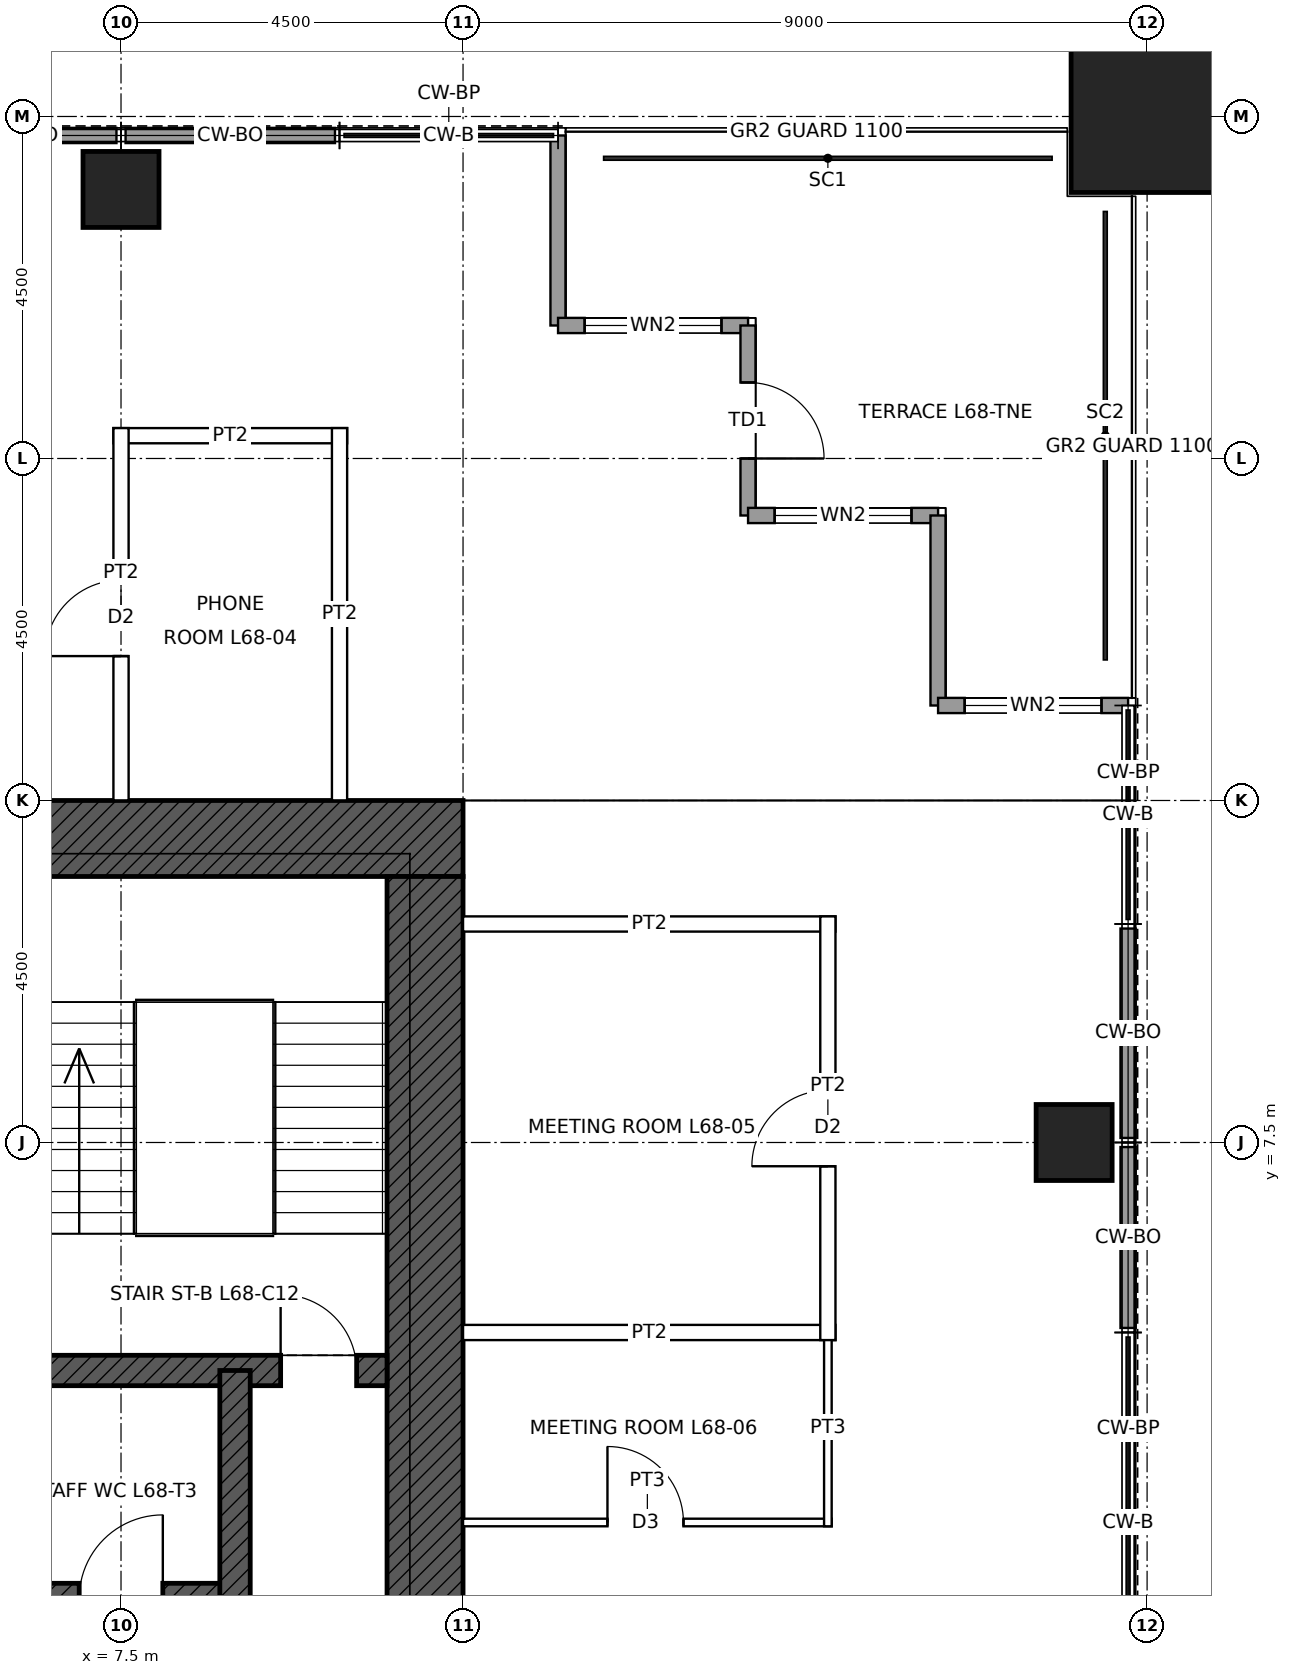
"""IFC4 building model, lengths in metres.
Left out: names, types, materials, properties, quantities, classifications, styles, units other than length and angle.
Written with IfcOpenShell. Run it as: python <this file> out.ifc"""

import sys

from ifc_helpers import new_model, si_unit, direction, frame, frame_2d, origin, origin_2d, place, context, subcontext, project, spatial, rectangle, hollow_rectangle, extrude, element, fill, save


model = new_model("IFC4")
c1 = context("Model", 3, precision=1e-05, world=origin(), true_north=direction((0.0, 1.0)))
c2 = subcontext(c1, "Body", "Model", "MODEL_VIEW")
j1 = project(units=[si_unit("LENGTHUNIT", "METRE"), si_unit("PLANEANGLEUNIT", "RADIAN")], contexts=[c1])
p1 = place(None, origin())
s1 = spatial("IfcSite", under=j1, at=p1, CompositionType="ELEMENT")
p2 = place(p1, origin())
s2 = spatial("IfcBuilding", under=s1, at=p2, CompositionType="ELEMENT")
p3 = place(p2, frame((0.0, 0.0, 307.9)))
s3 = spatial("IfcBuildingStorey", under=s2, at=p3, CompositionType="ELEMENT", Elevation=307.9)
p4 = place(p3, frame((21.0, 21.0, 0.0), z_axis=(0.0, 0.0, 1.0), x_axis=(1.0, 0.0, 0.0)))
e1 = element("IfcColumn", 1, at=p4, inside=s3, PredefinedType="COLUMN", context=c2, shape_type="SweptSolid", body=[
    extrude(hollow_rectangle(XDim=2.0, YDim=2.0, WallThickness=0.095, at=origin_2d()), origin(), (0.0, 0.0, 1.0), 4.0),
])
for number, where, z_axis, x_axis in (
    (2, (7.5, 20.04, 0.0), (0.0, 0.0, 1.0), (1.0, 0.0, 0.0)),
    (3, (20.04, 7.5, 0.0), (0.0, 0.0, 1.0), (1.0, 0.0, 0.0)),
):
    element("IfcColumn", number, at=place(p3, frame(where, z_axis=z_axis, x_axis=x_axis)), inside=s3, PredefinedType="COLUMN", context=c2, shape_type="SweptSolid", body=[
        extrude(hollow_rectangle(XDim=1.0, YDim=1.0, WallThickness=0.075, at=origin_2d()), origin(), (0.0, 0.0, 1.0), 4.0),
    ])
p5 = place(p3, frame((-12.0, 11.5, 0.0), z_axis=(0.0, 0.0, 1.0), x_axis=(1.0, 0.0, 0.0)))
e4 = element("IfcWall", 4, at=p5, inside=s3, PredefinedType="SHEAR", context=c2, shape_type="SweptSolid", body=[
    extrude(rectangle(XDim=24.0, YDim=1.0, at=frame_2d((12.0, 0.0))), origin(), (0.0, 0.0, 1.0), 4.0),
])
p6 = place(p5, frame((6.25, 0.0, 0.0)))
e5 = element("IfcOpeningElement", 5, at=p6, cuts=e4, PredefinedType="OPENING", context=c2, shape_type="SweptSolid", body=[
    extrude(rectangle(XDim=1.0, YDim=2.4, at=frame_2d((0.5, 1.2))), frame((0.0, 0.51, 0.0), z_axis=(0.0, -1.0, 0.0), x_axis=(1.0, 0.0, 0.0)), (0.0, 0.0, 1.0), 1.02),
])
p7 = place(p5, frame((16.75, 0.0, 0.0)))
e6 = element("IfcOpeningElement", 6, at=p7, cuts=e4, PredefinedType="OPENING", context=c2, shape_type="SweptSolid", body=[
    extrude(rectangle(XDim=1.0, YDim=2.4, at=frame_2d((0.5, 1.2))), frame((0.0, 0.51, 0.0), z_axis=(0.0, -1.0, 0.0), x_axis=(1.0, 0.0, 0.0)), (0.0, 0.0, 1.0), 1.02),
])
p8 = place(p3, frame((11.5, 11.0, 0.0), z_axis=(0.0, 0.0, 1.0), x_axis=(0.0, -1.0, 0.0)))
e7 = element("IfcWall", 7, at=p8, inside=s3, PredefinedType="SHEAR", context=c2, shape_type="SweptSolid", body=[
    extrude(rectangle(XDim=22.0, YDim=1.0, at=frame_2d((11.0, 0.0))), origin(), (0.0, 0.0, 1.0), 4.0),
])
p9 = place(p8, frame((10.5, 0.0, 0.0)))
e8 = element("IfcOpeningElement", 8, at=p9, cuts=e7, PredefinedType="OPENING", context=c2, shape_type="SweptSolid", body=[
    extrude(rectangle(XDim=1.0, YDim=2.4, at=frame_2d((0.5, 1.2))), frame((0.0, 0.51, 0.0), z_axis=(0.0, -1.0, 0.0), x_axis=(1.0, 0.0, 0.0)), (0.0, 0.0, 1.0), 1.02),
])
p10 = place(p3, frame((-11.0, 4.5, 0.0), z_axis=(0.0, 0.0, 1.0), x_axis=(1.0, 0.0, 0.0)))
e9 = element("IfcWall", 9, at=p10, inside=s3, PredefinedType="SHEAR", context=c2, shape_type="SweptSolid", body=[
    extrude(rectangle(XDim=22.0, YDim=0.4, at=frame_2d((11.0, 0.0))), origin(), (0.0, 0.0, 1.0), 4.0),
])
p11 = place(p10, frame((0.4, 0.0, 0.0)))
e10 = element("IfcOpeningElement", 10, at=p11, cuts=e9, PredefinedType="OPENING", context=c2, shape_type="SweptSolid", body=[
    extrude(rectangle(XDim=1.0, YDim=2.1, at=frame_2d((0.5, 1.05))), frame((0.0, 0.21, 0.0), z_axis=(0.0, -1.0, 0.0), x_axis=(1.0, 0.0, 0.0)), (0.0, 0.0, 1.0), 0.42),
])
p12 = place(p10, frame((20.6, 0.0, 0.0)))
e11 = element("IfcOpeningElement", 11, at=p12, cuts=e9, PredefinedType="OPENING", context=c2, shape_type="SweptSolid", body=[
    extrude(rectangle(XDim=1.0, YDim=2.1, at=frame_2d((0.5, 1.05))), frame((0.0, 0.21, 0.0), z_axis=(0.0, -1.0, 0.0), x_axis=(1.0, 0.0, 0.0)), (0.0, 0.0, 1.0), 0.42),
])
p13 = place(p3, frame((-9.0, 1.5, 0.0), z_axis=(0.0, 0.0, 1.0), x_axis=(1.0, 0.0, 0.0)))
e12 = element("IfcWall", 12, at=p13, inside=s3, PredefinedType="SHEAR", context=c2, shape_type="SweptSolid", body=[
    extrude(rectangle(XDim=18.0, YDim=0.4, at=frame_2d((9.0, 0.0))), origin(), (0.0, 0.0, 1.0), 4.0),
])
p14 = place(p13, frame((0.95, 0.0, 0.0)))
e13 = element("IfcOpeningElement", 13, at=p14, cuts=e12, PredefinedType="OPENING", context=c2, shape_type="SweptSolid", body=[
    extrude(rectangle(XDim=1.1, YDim=2.1, at=frame_2d((0.55, 1.05))), frame((0.0, 0.21, 0.0), z_axis=(0.0, -1.0, 0.0), x_axis=(1.0, 0.0, 0.0)), (0.0, 0.0, 1.0), 0.42),
])
p15 = place(p13, frame((3.95, 0.0, 0.0)))
e14 = element("IfcOpeningElement", 14, at=p15, cuts=e12, PredefinedType="OPENING", context=c2, shape_type="SweptSolid", body=[
    extrude(rectangle(XDim=1.1, YDim=2.1, at=frame_2d((0.55, 1.05))), frame((0.0, 0.21, 0.0), z_axis=(0.0, -1.0, 0.0), x_axis=(1.0, 0.0, 0.0)), (0.0, 0.0, 1.0), 0.42),
])
p16 = place(p13, frame((6.95, 0.0, 0.0)))
e15 = element("IfcOpeningElement", 15, at=p16, cuts=e12, PredefinedType="OPENING", context=c2, shape_type="SweptSolid", body=[
    extrude(rectangle(XDim=1.1, YDim=2.1, at=frame_2d((0.55, 1.05))), frame((0.0, 0.21, 0.0), z_axis=(0.0, -1.0, 0.0), x_axis=(1.0, 0.0, 0.0)), (0.0, 0.0, 1.0), 0.42),
])
p17 = place(p13, frame((9.95, 0.0, 0.0)))
e16 = element("IfcOpeningElement", 16, at=p17, cuts=e12, PredefinedType="OPENING", context=c2, shape_type="SweptSolid", body=[
    extrude(rectangle(XDim=1.1, YDim=2.1, at=frame_2d((0.55, 1.05))), frame((0.0, 0.21, 0.0), z_axis=(0.0, -1.0, 0.0), x_axis=(1.0, 0.0, 0.0)), (0.0, 0.0, 1.0), 0.42),
])
p18 = place(p13, frame((12.95, 0.0, 0.0)))
e17 = element("IfcOpeningElement", 17, at=p18, cuts=e12, PredefinedType="OPENING", context=c2, shape_type="SweptSolid", body=[
    extrude(rectangle(XDim=1.1, YDim=2.1, at=frame_2d((0.55, 1.05))), frame((0.0, 0.21, 0.0), z_axis=(0.0, -1.0, 0.0), x_axis=(1.0, 0.0, 0.0)), (0.0, 0.0, 1.0), 0.42),
])
p19 = place(p13, frame((15.95, 0.0, 0.0)))
e18 = element("IfcOpeningElement", 18, at=p19, cuts=e12, PredefinedType="OPENING", context=c2, shape_type="SweptSolid", body=[
    extrude(rectangle(XDim=1.1, YDim=2.1, at=frame_2d((0.55, 1.05))), frame((0.0, 0.21, 0.0), z_axis=(0.0, -1.0, 0.0), x_axis=(1.0, 0.0, 0.0)), (0.0, 0.0, 1.0), 0.42),
])
p20 = place(p3, frame((9.0, 1.5, 0.0), z_axis=(0.0, 0.0, 1.0), x_axis=(0.0, 1.0, 0.0)))
e19 = element("IfcWall", 19, at=p20, inside=s3, PredefinedType="SHEAR", context=c2, shape_type="SweptSolid", body=[
    extrude(rectangle(XDim=3.0, YDim=0.4, at=frame_2d((1.5, 0.0))), origin(), (0.0, 0.0, 1.0), 4.0),
])
p21 = place(p3, frame((13.25, 20.75, 0.0), z_axis=(0.0, 0.0, 1.0), x_axis=(0.0, -1.0, 0.0)))
e20 = element("IfcWall", 20, at=p21, inside=s3, PredefinedType="SOLIDWALL", context=c2, shape_type="SweptSolid", body=[
    extrude(rectangle(XDim=2.5, YDim=0.2, at=frame_2d((1.25, 0.0))), origin(), (0.0, 0.0, 1.0), 3.85),
])
p22 = place(p3, frame((13.25, 18.25, 0.0), z_axis=(0.0, 0.0, 1.0), x_axis=(1.0, 0.0, 0.0)))
e21 = element("IfcWall", 21, at=p22, inside=s3, PredefinedType="SOLIDWALL", context=c2, shape_type="SweptSolid", body=[
    extrude(rectangle(XDim=2.5, YDim=0.2, at=frame_2d((1.25, 0.0))), origin(), (0.0, 0.0, 1.0), 3.85),
])
p23 = place(p22, frame((0.35, 0.0, 0.3)))
e22 = element("IfcOpeningElement", 22, at=p23, cuts=e21, PredefinedType="OPENING", context=c2, shape_type="SweptSolid", body=[
    extrude(rectangle(XDim=1.8, YDim=2.4, at=frame_2d((0.9, 1.2))), frame((0.0, 0.11, 0.0), z_axis=(0.0, -1.0, 0.0), x_axis=(1.0, 0.0, 0.0)), (0.0, 0.0, 1.0), 0.22),
])
p24 = place(p3, frame((15.75, 18.25, 0.0), z_axis=(0.0, 0.0, 1.0), x_axis=(0.0, -1.0, 0.0)))
e23 = element("IfcWall", 23, at=p24, inside=s3, PredefinedType="SOLIDWALL", context=c2, shape_type="SweptSolid", body=[
    extrude(rectangle(XDim=2.5, YDim=0.2, at=frame_2d((1.25, 0.0))), origin(), (0.0, 0.0, 1.0), 3.317),
])
p25 = place(p24, frame((0.75, 0.0, 0.0)))
e24 = element("IfcOpeningElement", 24, at=p25, cuts=e23, PredefinedType="OPENING", context=c2, shape_type="SweptSolid", body=[
    extrude(rectangle(XDim=1.0, YDim=2.4, at=frame_2d((0.5, 1.2))), frame((0.0, 0.11, 0.0), z_axis=(0.0, -1.0, 0.0), x_axis=(1.0, 0.0, 0.0)), (0.0, 0.0, 1.0), 0.22),
])
p26 = place(p3, frame((15.75, 15.75, 0.0), z_axis=(0.0, 0.0, 1.0), x_axis=(1.0, 0.0, 0.0)))
e25 = element("IfcWall", 25, at=p26, inside=s3, PredefinedType="SOLIDWALL", context=c2, shape_type="SweptSolid", body=[
    extrude(rectangle(XDim=2.5, YDim=0.2, at=frame_2d((1.25, 0.0))), origin(), (0.0, 0.0, 1.0), 3.85),
])
p27 = place(p26, frame((0.35, 0.0, 0.3)))
e26 = element("IfcOpeningElement", 26, at=p27, cuts=e25, PredefinedType="OPENING", context=c2, shape_type="SweptSolid", body=[
    extrude(rectangle(XDim=1.8, YDim=2.4, at=frame_2d((0.9, 1.2))), frame((0.0, 0.11, 0.0), z_axis=(0.0, -1.0, 0.0), x_axis=(1.0, 0.0, 0.0)), (0.0, 0.0, 1.0), 0.22),
])
p28 = place(p3, frame((18.25, 15.75, 0.0), z_axis=(0.0, 0.0, 1.0), x_axis=(0.0, -1.0, 0.0)))
e27 = element("IfcWall", 27, at=p28, inside=s3, PredefinedType="SOLIDWALL", context=c2, shape_type="SweptSolid", body=[
    extrude(rectangle(XDim=2.5, YDim=0.2, at=frame_2d((1.25, 0.0))), origin(), (0.0, 0.0, 1.0), 3.85),
])
p29 = place(p3, frame((18.25, 13.25, 0.0), z_axis=(0.0, 0.0, 1.0), x_axis=(1.0, 0.0, 0.0)))
e28 = element("IfcWall", 28, at=p29, inside=s3, PredefinedType="SOLIDWALL", context=c2, shape_type="SweptSolid", body=[
    extrude(rectangle(XDim=2.5, YDim=0.2, at=frame_2d((1.25, 0.0))), origin(), (0.0, 0.0, 1.0), 3.85),
])
p30 = place(p29, frame((0.35, 0.0, 0.3)))
e29 = element("IfcOpeningElement", 29, at=p30, cuts=e28, PredefinedType="OPENING", context=c2, shape_type="SweptSolid", body=[
    extrude(rectangle(XDim=1.8, YDim=2.4, at=frame_2d((0.9, 1.2))), frame((0.0, 0.11, 0.0), z_axis=(0.0, -1.0, 0.0), x_axis=(1.0, 0.0, 0.0)), (0.0, 0.0, 1.0), 0.22),
])
p31 = place(p3, frame((5.06, 20.75, 0.0), z_axis=(0.0, 0.0, 1.0), x_axis=(1.0, 0.0, 0.0)))
e30 = element("IfcWall", 30, at=p31, inside=s3, PredefinedType="SOLIDWALL", context=c2, shape_type="SweptSolid", body=[
    extrude(rectangle(XDim=2.38, YDim=0.2, at=frame_2d((1.19, 0.0))), origin(), (0.0, 0.0, 1.0), 3.85),
])
for number, where, z_axis, x_axis in (
    (31, (7.56, 20.75, 0.0), (0.0, 0.0, 1.0), (1.0, 0.0, 0.0)),
    (32, (20.75, 10.315, 0.0), (0.0, 0.0, 1.0), (0.0, -1.0, 0.0)),
):
    element("IfcWall", number, at=place(p3, frame(where, z_axis=z_axis, x_axis=x_axis)), inside=s3, PredefinedType="SOLIDWALL", context=c2, shape_type="SweptSolid", body=[
        extrude(rectangle(XDim=2.755, YDim=0.2, at=frame_2d((1.377, 0.0))), origin(), (0.0, 0.0, 1.0), 3.85),
    ])
p32 = place(p3, frame((20.75, 7.44, 0.0), z_axis=(0.0, 0.0, 1.0), x_axis=(0.0, -1.0, 0.0)))
e33 = element("IfcWall", 33, at=p32, inside=s3, PredefinedType="SOLIDWALL", context=c2, shape_type="SweptSolid", body=[
    extrude(rectangle(XDim=2.38, YDim=0.2, at=frame_2d((1.19, 0.0))), origin(), (0.0, 0.0, 1.0), 3.85),
])
p33 = place(p3, frame((12.0, 2.5, 0.0), z_axis=(0.0, 0.0, 1.0), x_axis=(1.0, 0.0, 0.0)))
e34 = element("IfcWall", 34, at=p33, inside=s3, PredefinedType="PARTITIONING", context=c2, shape_type="SweptSolid", body=[
    extrude(rectangle(XDim=4.85, YDim=0.1, at=frame_2d((2.425, 0.0))), origin(), (0.0, 0.0, 1.0), 3.85),
])
p34 = place(p33, frame((1.9, 0.0, 0.0)))
e35 = element("IfcOpeningElement", 35, at=p34, cuts=e34, PredefinedType="OPENING", context=c2, shape_type="SweptSolid", body=[
    extrude(rectangle(XDim=1.0, YDim=2.1, at=frame_2d((0.5, 1.05))), frame((0.0, 0.06, 0.0), z_axis=(0.0, -1.0, 0.0), x_axis=(1.0, 0.0, 0.0)), (0.0, 0.0, 1.0), 0.12),
])
for number, where, z_axis, x_axis in (
    (36, (12.0, 5.0, 0.0), (0.0, 0.0, 1.0), (1.0, 0.0, 0.0)),
    (37, (12.0, 10.375, 0.0), (0.0, 0.0, 1.0), (1.0, 0.0, 0.0)),
):
    element("IfcWall", number, at=place(p3, frame(where, z_axis=z_axis, x_axis=x_axis)), inside=s3, PredefinedType="PARTITIONING", context=c2, shape_type="SweptSolid", body=[
        extrude(rectangle(XDim=4.9, YDim=0.2, at=frame_2d((2.45, 0.0))), origin(), (0.0, 0.0, 1.0), 3.85),
    ])
p35 = place(p3, frame((7.4, 16.8, 0.0), z_axis=(0.0, 0.0, 1.0), x_axis=(1.0, 0.0, 0.0)))
e38 = element("IfcWall", 38, at=p35, inside=s3, PredefinedType="PARTITIONING", context=c2, shape_type="SweptSolid", body=[
    extrude(rectangle(XDim=3.075, YDim=0.2, at=frame_2d((1.538, 0.0))), origin(), (0.0, 0.0, 1.0), 3.85),
])
p36 = place(p3, frame((7.5, 12.0, 0.0), z_axis=(0.0, 0.0, 1.0), x_axis=(0.0, 1.0, 0.0)))
e39 = element("IfcWall", 39, at=p36, inside=s3, PredefinedType="PARTITIONING", context=c2, shape_type="SweptSolid", body=[
    extrude(rectangle(XDim=4.9, YDim=0.2, at=frame_2d((2.45, 0.0))), origin(), (0.0, 0.0, 1.0), 3.243),
])
p37 = place(p36, frame((1.9, 0.0, 0.0)))
e40 = element("IfcOpeningElement", 40, at=p37, cuts=e39, PredefinedType="OPENING", context=c2, shape_type="SweptSolid", body=[
    extrude(rectangle(XDim=1.0, YDim=2.1, at=frame_2d((0.5, 1.05))), frame((0.0, 0.11, 0.0), z_axis=(0.0, -1.0, 0.0), x_axis=(1.0, 0.0, 0.0)), (0.0, 0.0, 1.0), 0.22),
])
p38 = place(p3, frame((10.375, 12.0, 0.0), z_axis=(0.0, 0.0, 1.0), x_axis=(0.0, 1.0, 0.0)))
e41 = element("IfcWall", 41, at=p38, inside=s3, PredefinedType="PARTITIONING", context=c2, shape_type="SweptSolid", body=[
    extrude(rectangle(XDim=4.9, YDim=0.2, at=frame_2d((2.45, 0.0))), origin(), (0.0, 0.0, 1.0), 3.85),
])
p39 = place(p3, frame((16.8, 2.45, 0.0), z_axis=(0.0, 0.0, 1.0), x_axis=(0.0, 1.0, 0.0)))
e42 = element("IfcWall", 42, at=p39, inside=s3, PredefinedType="PARTITIONING", context=c2, shape_type="SweptSolid", body=[
    extrude(rectangle(XDim=2.6, YDim=0.1, at=frame_2d((1.3, 0.0))), origin(), (0.0, 0.0, 1.0), 3.85),
])
p40 = place(p3, frame((16.8, 4.9, 0.0), z_axis=(0.0, 0.0, 1.0), x_axis=(0.0, 1.0, 0.0)))
e43 = element("IfcWall", 43, at=p40, inside=s3, PredefinedType="PARTITIONING", context=c2, shape_type="SweptSolid", body=[
    extrude(rectangle(XDim=5.575, YDim=0.2, at=frame_2d((2.788, 0.0))), origin(), (0.0, 0.0, 1.0), 3.85),
])
p41 = place(p40, frame((2.288, 0.0, 0.0)))
e44 = element("IfcOpeningElement", 44, at=p41, cuts=e43, PredefinedType="OPENING", context=c2, shape_type="SweptSolid", body=[
    extrude(rectangle(XDim=1.0, YDim=2.1, at=frame_2d((0.5, 1.05))), frame((0.0, 0.11, 0.0), z_axis=(0.0, -1.0, 0.0), x_axis=(1.0, 0.0, 0.0)), (0.0, 0.0, 1.0), 0.22),
])
p42 = place(p23, origin())
e45 = element("IfcWindow", 45, at=p42, inside=s3, PartitioningType="SINGLE_PANEL", PredefinedType="WINDOW", context=c2, shape_type="SweptSolid", body=[
    extrude(rectangle(XDim=1.8, YDim=2.4, at=frame_2d((0.9, 1.2))), frame((0.0, 0.03, 0.0), z_axis=(0.0, -1.0, 0.0), x_axis=(1.0, 0.0, 0.0)), (0.0, 0.0, 1.0), 0.06),
])
fill(e22, e45)
p43 = place(p25, origin())
e46 = element("IfcDoor", 46, at=p43, inside=s3, OperationType="SINGLE_SWING_RIGHT", PredefinedType="DOOR", context=c2, shape_type="SweptSolid", body=[
    extrude(rectangle(XDim=1.0, YDim=2.4, at=frame_2d((0.5, 1.2))), frame((0.0, 0.025, 0.0), z_axis=(0.0, -1.0, 0.0), x_axis=(1.0, 0.0, 0.0)), (0.0, 0.0, 1.0), 0.05),
])
fill(e24, e46)
p44 = place(p27, origin())
e47 = element("IfcWindow", 47, at=p44, inside=s3, PartitioningType="SINGLE_PANEL", PredefinedType="WINDOW", context=c2, shape_type="SweptSolid", body=[
    extrude(rectangle(XDim=1.8, YDim=2.4, at=frame_2d((0.9, 1.2))), frame((0.0, 0.03, 0.0), z_axis=(0.0, -1.0, 0.0), x_axis=(1.0, 0.0, 0.0)), (0.0, 0.0, 1.0), 0.06),
])
fill(e26, e47)
p45 = place(p30, origin())
e48 = element("IfcWindow", 48, at=p45, inside=s3, PartitioningType="SINGLE_PANEL", PredefinedType="WINDOW", context=c2, shape_type="SweptSolid", body=[
    extrude(rectangle(XDim=1.8, YDim=2.4, at=frame_2d((0.9, 1.2))), frame((0.0, 0.03, 0.0), z_axis=(0.0, -1.0, 0.0), x_axis=(1.0, 0.0, 0.0)), (0.0, 0.0, 1.0), 0.06),
])
fill(e29, e48)
p46 = place(p12, origin())
e49 = element("IfcDoor", 49, at=p46, inside=s3, OperationType="SINGLE_SWING_LEFT", PredefinedType="DOOR", context=c2, shape_type="SweptSolid", body=[
    extrude(rectangle(XDim=1.0, YDim=2.1, at=frame_2d((0.5, 1.05))), frame((0.0, 0.025, 0.0), z_axis=(0.0, -1.0, 0.0), x_axis=(1.0, 0.0, 0.0)), (0.0, 0.0, 1.0), 0.05),
])
fill(e11, e49)
p47 = place(p37, origin())
e50 = element("IfcDoor", 50, at=p47, inside=s3, OperationType="SINGLE_SWING_LEFT", PredefinedType="DOOR", context=c2, shape_type="SweptSolid", body=[
    extrude(rectangle(XDim=1.0, YDim=2.1, at=frame_2d((0.5, 1.05))), frame((0.0, 0.025, 0.0), z_axis=(0.0, -1.0, 0.0), x_axis=(1.0, 0.0, 0.0)), (0.0, 0.0, 1.0), 0.05),
])
fill(e40, e50)
p48 = place(p41, origin())
e51 = element("IfcDoor", 51, at=p48, inside=s3, OperationType="SINGLE_SWING_LEFT", PredefinedType="DOOR", context=c2, shape_type="SweptSolid", body=[
    extrude(rectangle(XDim=1.0, YDim=2.1, at=frame_2d((0.5, 1.05))), frame((0.0, 0.025, 0.0), z_axis=(0.0, -1.0, 0.0), x_axis=(1.0, 0.0, 0.0)), (0.0, 0.0, 1.0), 0.05),
])
fill(e44, e51)
p49 = place(p34, origin())
e52 = element("IfcDoor", 52, at=p49, inside=s3, OperationType="SINGLE_SWING_LEFT", PredefinedType="DOOR", context=c2, shape_type="SweptSolid", body=[
    extrude(rectangle(XDim=1.0, YDim=2.1, at=frame_2d((0.5, 1.05))), frame((0.0, 0.025, 0.0), z_axis=(0.0, -1.0, 0.0), x_axis=(1.0, 0.0, 0.0)), (0.0, 0.0, 1.0), 0.05),
])
fill(e35, e52)
save(model, sys.argv[1])
